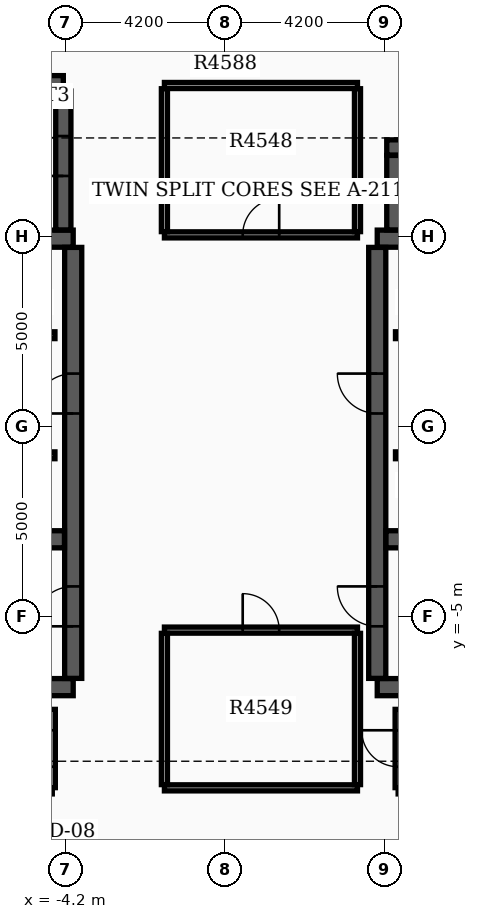
"""IFC4 building model, lengths in metres.
Left out: names, types, materials, properties, quantities, classifications, styles, units other than length and angle.
Written with IfcOpenShell. Run it as: python <this file> out.ifc"""

import sys

from ifc_helpers import new_model, si_unit, direction, frame, frame_2d, origin, place, context, subcontext, project, spatial, rectangle, extrude, element, fill, save


model = new_model("IFC4")
c1 = context("Model", 3, precision=1e-05, world=origin(), true_north=direction((0.0, 1.0)))
c2 = subcontext(c1, "Body", "Model", "MODEL_VIEW")
j1 = project(units=[si_unit("LENGTHUNIT", "METRE"), si_unit("PLANEANGLEUNIT", "RADIAN")], contexts=[c1])
p1 = place(None, origin())
s1 = spatial("IfcSite", under=j1, at=p1, CompositionType="ELEMENT")
p2 = place(p1, origin())
s2 = spatial("IfcBuilding", under=s1, at=p2, CompositionType="ELEMENT")
p3 = place(p2, frame((0.0, 0.0, 285.0)))
s3 = spatial("IfcBuildingStorey", under=s2, at=p3, CompositionType="ELEMENT", Elevation=285.0)
for number, where, z_axis, x_axis in (
    (1, (-12.4, -6.85, 0.0), (0.0, 0.0, 1.0), (1.0, 0.0, 0.0)),
    (2, (-12.4, 4.95, 0.0), (0.0, 0.0, 1.0), (1.0, 0.0, 0.0)),
):
    element("IfcWall", number, at=place(p3, frame(where, z_axis=z_axis, x_axis=x_axis)), inside=s3, PredefinedType="SHEAR", context=c2, shape_type="SweptSolid", body=[
        extrude(rectangle(XDim=8.4, YDim=0.45, at=frame_2d((4.2, 0.0))), origin(), (0.0, 0.0, 1.0), 3.65),
    ])
p4 = place(p3, frame((-4.0, -6.62, 0.0), z_axis=(0.0, 0.0, 1.0), x_axis=(0.0, 1.0, 0.0)))
e3 = element("IfcWall", 3, at=p4, inside=s3, PredefinedType="SHEAR", context=c2, shape_type="SweptSolid", body=[
    extrude(rectangle(XDim=11.34, YDim=0.45, at=frame_2d((5.67, 0.0))), origin(), (0.0, 0.0, 1.0), 3.65),
])
p5 = place(p4, frame((1.37, 0.0, 0.0)))
e4 = element("IfcOpeningElement", 4, at=p5, cuts=e3, PredefinedType="OPENING", context=c2, shape_type="SweptSolid", body=[
    extrude(rectangle(XDim=1.05, YDim=2.15, at=frame_2d((0.525, 1.075))), frame((0.0, 0.235, 0.0), z_axis=(0.0, -1.0, 0.0), x_axis=(1.0, 0.0, 0.0)), (0.0, 0.0, 1.0), 0.47),
])
p6 = place(p4, frame((6.97, 0.0, 0.0)))
e5 = element("IfcOpeningElement", 5, at=p6, cuts=e3, PredefinedType="OPENING", context=c2, shape_type="SweptSolid", body=[
    extrude(rectangle(XDim=1.05, YDim=2.15, at=frame_2d((0.525, 1.075))), frame((0.0, 0.235, 0.0), z_axis=(0.0, -1.0, 0.0), x_axis=(1.0, 0.0, 0.0)), (0.0, 0.0, 1.0), 0.47),
])
p7 = place(p3, frame((-12.17, -2.96, 0.0), z_axis=(0.0, 0.0, 1.0), x_axis=(1.0, 0.0, 0.0)))
e6 = element("IfcWall", 6, at=p7, inside=s3, PredefinedType="SHEAR", context=c2, shape_type="SweptSolid", body=[
    extrude(rectangle(XDim=7.94, YDim=0.45, at=frame_2d((3.97, 0.0))), origin(), (0.0, 0.0, 1.0), 3.65),
])
for number, where, z_axis, x_axis in (
    (7, (4.0, -6.85, 0.0), (0.0, 0.0, 1.0), (1.0, 0.0, 0.0)),
    (8, (4.0, 4.95, 0.0), (0.0, 0.0, 1.0), (1.0, 0.0, 0.0)),
):
    element("IfcWall", number, at=place(p3, frame(where, z_axis=z_axis, x_axis=x_axis)), inside=s3, PredefinedType="SHEAR", context=c2, shape_type="SweptSolid", body=[
        extrude(rectangle(XDim=8.4, YDim=0.45, at=frame_2d((4.2, 0.0))), origin(), (0.0, 0.0, 1.0), 3.65),
    ])
p8 = place(p3, frame((4.0, -6.62, 0.0), z_axis=(0.0, 0.0, 1.0), x_axis=(0.0, 1.0, 0.0)))
e9 = element("IfcWall", 9, at=p8, inside=s3, PredefinedType="SHEAR", context=c2, shape_type="SweptSolid", body=[
    extrude(rectangle(XDim=11.34, YDim=0.45, at=frame_2d((5.67, 0.0))), origin(), (0.0, 0.0, 1.0), 3.65),
])
p9 = place(p8, frame((1.37, 0.0, 0.0)))
e10 = element("IfcOpeningElement", 10, at=p9, cuts=e9, PredefinedType="OPENING", context=c2, shape_type="SweptSolid", body=[
    extrude(rectangle(XDim=1.05, YDim=2.15, at=frame_2d((0.525, 1.075))), frame((0.0, 0.235, 0.0), z_axis=(0.0, -1.0, 0.0), x_axis=(1.0, 0.0, 0.0)), (0.0, 0.0, 1.0), 0.47),
])
p10 = place(p8, frame((6.97, 0.0, 0.0)))
e11 = element("IfcOpeningElement", 11, at=p10, cuts=e9, PredefinedType="OPENING", context=c2, shape_type="SweptSolid", body=[
    extrude(rectangle(XDim=1.05, YDim=2.15, at=frame_2d((0.525, 1.075))), frame((0.0, 0.235, 0.0), z_axis=(0.0, -1.0, 0.0), x_axis=(1.0, 0.0, 0.0)), (0.0, 0.0, 1.0), 0.47),
])
p11 = place(p3, frame((4.23, -2.96, 0.0), z_axis=(0.0, 0.0, 1.0), x_axis=(1.0, 0.0, 0.0)))
e12 = element("IfcWall", 12, at=p11, inside=s3, PredefinedType="SHEAR", context=c2, shape_type="SweptSolid", body=[
    extrude(rectangle(XDim=7.94, YDim=0.45, at=frame_2d((3.97, 0.0))), origin(), (0.0, 0.0, 1.0), 3.65),
])
p12 = place(p3, frame((-12.22, 9.04, 0.0), z_axis=(0.0, 0.0, 1.0), x_axis=(1.0, 0.0, 0.0)))
e13 = element("IfcWall", 13, at=p12, inside=s3, PredefinedType="SHEAR", context=c2, shape_type="SweptSolid", body=[
    extrude(rectangle(XDim=7.96, YDim=0.4, at=frame_2d((3.98, 0.0))), origin(), (0.0, 0.0, 1.0), 3.65),
])
p13 = place(p3, frame((-4.26, 5.18, 0.0), z_axis=(0.0, 0.0, 1.0), x_axis=(0.0, 1.0, 0.0)))
e14 = element("IfcWall", 14, at=p13, inside=s3, PredefinedType="SHEAR", context=c2, shape_type="SweptSolid", body=[
    extrude(rectangle(XDim=3.655, YDim=0.4, at=frame_2d((1.828, 0.0))), origin(), (0.0, 0.0, 1.0), 3.65),
])
p14 = place(p13, frame((1.42, 0.0, 0.0)))
e15 = element("IfcOpeningElement", 15, at=p14, cuts=e14, PredefinedType="OPENING", context=c2, shape_type="SweptSolid", body=[
    extrude(rectangle(XDim=1.05, YDim=2.15, at=frame_2d((0.525, 1.075))), frame((0.0, 0.21, 0.0), z_axis=(0.0, -1.0, 0.0), x_axis=(1.0, 0.0, 0.0)), (0.0, 0.0, 1.0), 0.42),
])
p15 = place(p3, frame((4.45, 5.18, 0.0), z_axis=(0.0, 0.0, 1.0), x_axis=(0.0, 1.0, 0.0)))
e16 = element("IfcWall", 16, at=p15, inside=s3, PredefinedType="SHEAR", context=c2, shape_type="SweptSolid", body=[
    extrude(rectangle(XDim=1.96, YDim=0.4, at=frame_2d((0.98, 0.0))), origin(), (0.0, 0.0, 1.0), 3.65),
])
p16 = place(p3, frame((4.25, 7.35, 0.0), z_axis=(0.0, 0.0, 1.0), x_axis=(1.0, 0.0, 0.0)))
e17 = element("IfcWall", 17, at=p16, inside=s3, PredefinedType="SHEAR", context=c2, shape_type="SweptSolid", body=[
    extrude(rectangle(XDim=5.4, YDim=0.4, at=frame_2d((2.7, 0.0))), origin(), (0.0, 0.0, 1.0), 3.65),
])
p17 = place(p3, frame((-11.9, 2.41, 0.0), z_axis=(0.0, 0.0, 1.0), x_axis=(1.0, 0.0, 0.0)))
e18 = element("IfcWall", 18, at=p17, inside=s3, PredefinedType="SOLIDWALL", context=c2, shape_type="SweptSolid", body=[
    extrude(rectangle(XDim=7.42, YDim=0.18, at=frame_2d((3.71, 0.0))), origin(), (0.0, 0.0, 1.0), 3.12),
])
p18 = place(p17, frame((0.55, 0.0, 0.0)))
e19 = element("IfcOpeningElement", 19, at=p18, cuts=e18, PredefinedType="OPENING", context=c2, shape_type="SweptSolid", body=[
    extrude(rectangle(XDim=1.1, YDim=2.15, at=frame_2d((0.55, 1.075))), frame((0.0, 0.1, 0.0), z_axis=(0.0, -1.0, 0.0), x_axis=(1.0, 0.0, 0.0)), (0.0, 0.0, 1.0), 0.2),
])
p19 = place(p17, frame((4.9, 0.0, 0.0)))
e20 = element("IfcOpeningElement", 20, at=p19, cuts=e18, PredefinedType="OPENING", context=c2, shape_type="SweptSolid", body=[
    extrude(rectangle(XDim=0.88, YDim=2.1, at=frame_2d((0.44, 1.05))), frame((0.0, 0.1, 0.0), z_axis=(0.0, -1.0, 0.0), x_axis=(1.0, 0.0, 0.0)), (0.0, 0.0, 1.0), 0.2),
])
p20 = place(p3, frame((4.48, 2.41, 0.0), z_axis=(0.0, 0.0, 1.0), x_axis=(1.0, 0.0, 0.0)))
e21 = element("IfcWall", 21, at=p20, inside=s3, PredefinedType="SOLIDWALL", context=c2, shape_type="SweptSolid", body=[
    extrude(rectangle(XDim=7.42, YDim=0.18, at=frame_2d((3.71, 0.0))), origin(), (0.0, 0.0, 1.0), 3.12),
])
p21 = place(p20, frame((5.67, 0.0, 0.0)))
e22 = element("IfcOpeningElement", 22, at=p21, cuts=e21, PredefinedType="OPENING", context=c2, shape_type="SweptSolid", body=[
    extrude(rectangle(XDim=1.1, YDim=2.15, at=frame_2d((0.55, 1.075))), frame((0.0, 0.1, 0.0), z_axis=(0.0, -1.0, 0.0), x_axis=(1.0, 0.0, 0.0)), (0.0, 0.0, 1.0), 0.2),
])
p22 = place(p20, frame((1.6, 0.0, 0.0)))
e23 = element("IfcOpeningElement", 23, at=p22, cuts=e21, PredefinedType="OPENING", context=c2, shape_type="SweptSolid", body=[
    extrude(rectangle(XDim=0.88, YDim=2.1, at=frame_2d((0.44, 1.05))), frame((0.0, 0.1, 0.0), z_axis=(0.0, -1.0, 0.0), x_axis=(1.0, 0.0, 0.0)), (0.0, 0.0, 1.0), 0.2),
])
p23 = place(p3, frame((-11.9, -0.75, 0.0), z_axis=(0.0, 0.0, 1.0), x_axis=(1.0, 0.0, 0.0)))
e24 = element("IfcWall", 24, at=p23, inside=s3, PredefinedType="SOLIDWALL", context=c2, shape_type="SweptSolid", body=[
    extrude(rectangle(XDim=7.42, YDim=0.18, at=frame_2d((3.71, 0.0))), origin(), (0.0, 0.0, 1.0), 3.12),
])
p24 = place(p23, frame((5.75, 0.0, 0.0)))
e25 = element("IfcOpeningElement", 25, at=p24, cuts=e24, PredefinedType="OPENING", context=c2, shape_type="SweptSolid", body=[
    extrude(rectangle(XDim=1.1, YDim=2.15, at=frame_2d((0.55, 1.075))), frame((0.0, 0.1, 0.0), z_axis=(0.0, -1.0, 0.0), x_axis=(1.0, 0.0, 0.0)), (0.0, 0.0, 1.0), 0.2),
])
p25 = place(p23, frame((1.6, 0.0, 0.0)))
e26 = element("IfcOpeningElement", 26, at=p25, cuts=e24, PredefinedType="OPENING", context=c2, shape_type="SweptSolid", body=[
    extrude(rectangle(XDim=0.88, YDim=2.1, at=frame_2d((0.44, 1.05))), frame((0.0, 0.1, 0.0), z_axis=(0.0, -1.0, 0.0), x_axis=(1.0, 0.0, 0.0)), (0.0, 0.0, 1.0), 0.2),
])
p26 = place(p3, frame((4.48, -0.75, 0.0), z_axis=(0.0, 0.0, 1.0), x_axis=(1.0, 0.0, 0.0)))
e27 = element("IfcWall", 27, at=p26, inside=s3, PredefinedType="SOLIDWALL", context=c2, shape_type="SweptSolid", body=[
    extrude(rectangle(XDim=7.42, YDim=0.18, at=frame_2d((3.71, 0.0))), origin(), (0.0, 0.0, 1.0), 3.12),
])
p27 = place(p26, frame((3.92, 0.0, 0.0)))
e28 = element("IfcOpeningElement", 28, at=p27, cuts=e27, PredefinedType="OPENING", context=c2, shape_type="SweptSolid", body=[
    extrude(rectangle(XDim=1.1, YDim=2.15, at=frame_2d((0.55, 1.075))), frame((0.0, 0.1, 0.0), z_axis=(0.0, -1.0, 0.0), x_axis=(1.0, 0.0, 0.0)), (0.0, 0.0, 1.0), 0.2),
])
p28 = place(p26, frame((5.82, 0.0, 0.0)))
e29 = element("IfcOpeningElement", 29, at=p28, cuts=e27, PredefinedType="OPENING", context=c2, shape_type="SweptSolid", body=[
    extrude(rectangle(XDim=1.1, YDim=2.15, at=frame_2d((0.55, 1.075))), frame((0.0, 0.1, 0.0), z_axis=(0.0, -1.0, 0.0), x_axis=(1.0, 0.0, 0.0)), (0.0, 0.0, 1.0), 0.2),
])
p29 = place(p26, frame((1.6, 0.0, 0.0)))
e30 = element("IfcOpeningElement", 30, at=p29, cuts=e27, PredefinedType="OPENING", context=c2, shape_type="SweptSolid", body=[
    extrude(rectangle(XDim=0.88, YDim=2.1, at=frame_2d((0.44, 1.05))), frame((0.0, 0.1, 0.0), z_axis=(0.0, -1.0, 0.0), x_axis=(1.0, 0.0, 0.0)), (0.0, 0.0, 1.0), 0.2),
])
p30 = place(p3, frame((-1.6, 5.05, 0.0), z_axis=(0.0, 0.0, 1.0), x_axis=(1.0, 0.0, 0.0)))
e31 = element("IfcWall", 31, at=p30, inside=s3, PredefinedType="PARTITIONING", context=c2, shape_type="SweptSolid", body=[
    extrude(rectangle(XDim=5.08, YDim=0.16, at=frame_2d((2.54, 0.0))), origin(), (0.0, 0.0, 1.0), 3.12),
])
p31 = place(p30, frame((2.06, 0.0, 0.0)))
e32 = element("IfcOpeningElement", 32, at=p31, cuts=e31, PredefinedType="OPENING", context=c2, shape_type="SweptSolid", body=[
    extrude(rectangle(XDim=0.96, YDim=2.15, at=frame_2d((0.48, 1.075))), frame((0.0, 0.09, 0.0), z_axis=(0.0, -1.0, 0.0), x_axis=(1.0, 0.0, 0.0)), (0.0, 0.0, 1.0), 0.18),
])
p32 = place(p3, frame((-1.6, 8.98, 0.0), z_axis=(0.0, 0.0, 1.0), x_axis=(1.0, 0.0, 0.0)))
e33 = element("IfcWall", 33, at=p32, inside=s3, PredefinedType="PARTITIONING", context=c2, shape_type="SweptSolid", body=[
    extrude(rectangle(XDim=5.08, YDim=0.16, at=frame_2d((2.54, 0.0))), origin(), (0.0, 0.0, 1.0), 3.12),
])
for number, where, z_axis, x_axis in (
    (34, (-1.6, 5.135, 0.0), (0.0, 0.0, 1.0), (0.0, 1.0, 0.0)),
    (35, (3.48, 5.135, 0.0), (0.0, 0.0, 1.0), (0.0, 1.0, 0.0)),
):
    element("IfcWall", number, at=place(p3, frame(where, z_axis=z_axis, x_axis=x_axis)), inside=s3, PredefinedType="PARTITIONING", context=c2, shape_type="SweptSolid", body=[
        extrude(rectangle(XDim=3.76, YDim=0.16, at=frame_2d((1.88, 0.0))), origin(), (0.0, 0.0, 1.0), 3.12),
    ])
p33 = place(p3, frame((-1.6, -9.5, 0.0), z_axis=(0.0, 0.0, 1.0), x_axis=(1.0, 0.0, 0.0)))
e36 = element("IfcWall", 36, at=p33, inside=s3, PredefinedType="PARTITIONING", context=c2, shape_type="SweptSolid", body=[
    extrude(rectangle(XDim=5.08, YDim=0.16, at=frame_2d((2.54, 0.0))), origin(), (0.0, 0.0, 1.0), 3.12),
])
p34 = place(p3, frame((-1.6, -5.35, 0.0), z_axis=(0.0, 0.0, 1.0), x_axis=(1.0, 0.0, 0.0)))
e37 = element("IfcWall", 37, at=p34, inside=s3, PredefinedType="PARTITIONING", context=c2, shape_type="SweptSolid", body=[
    extrude(rectangle(XDim=5.08, YDim=0.16, at=frame_2d((2.54, 0.0))), origin(), (0.0, 0.0, 1.0), 3.12),
])
p35 = place(p34, frame((2.06, 0.0, 0.0)))
e38 = element("IfcOpeningElement", 38, at=p35, cuts=e37, PredefinedType="OPENING", context=c2, shape_type="SweptSolid", body=[
    extrude(rectangle(XDim=0.96, YDim=2.15, at=frame_2d((0.48, 1.075))), frame((0.0, 0.09, 0.0), z_axis=(0.0, -1.0, 0.0), x_axis=(1.0, 0.0, 0.0)), (0.0, 0.0, 1.0), 0.18),
])
for number, where, z_axis, x_axis in (
    (39, (-1.6, -9.415, 0.0), (0.0, 0.0, 1.0), (0.0, 1.0, 0.0)),
    (40, (3.48, -9.415, 0.0), (0.0, 0.0, 1.0), (0.0, 1.0, 0.0)),
):
    element("IfcWall", number, at=place(p3, frame(where, z_axis=z_axis, x_axis=x_axis)), inside=s3, PredefinedType="PARTITIONING", context=c2, shape_type="SweptSolid", body=[
        extrude(rectangle(XDim=3.98, YDim=0.16, at=frame_2d((1.99, 0.0))), origin(), (0.0, 0.0, 1.0), 3.12),
    ])
p36 = place(p3, frame((4.55, -9.58, 0.0), z_axis=(0.0, 0.0, 1.0), x_axis=(1.0, 0.0, 0.0)))
e41 = element("IfcWall", 41, at=p36, inside=s3, PredefinedType="PARTITIONING", context=c2, shape_type="SweptSolid", body=[
    extrude(rectangle(XDim=8.1, YDim=0.16, at=frame_2d((4.05, 0.0))), origin(), (0.0, 0.0, 1.0), 3.12),
])
p37 = place(p3, frame((4.55, -9.495, 0.0), z_axis=(0.0, 0.0, 1.0), x_axis=(0.0, 1.0, 0.0)))
e42 = element("IfcWall", 42, at=p37, inside=s3, PredefinedType="PARTITIONING", context=c2, shape_type="SweptSolid", body=[
    extrude(rectangle(XDim=2.06, YDim=0.16, at=frame_2d((1.03, 0.0))), origin(), (0.0, 0.0, 1.0), 3.12),
])
p38 = place(p37, frame((0.55, 0.0, 0.0)))
e43 = element("IfcOpeningElement", 43, at=p38, cuts=e42, PredefinedType="OPENING", context=c2, shape_type="SweptSolid", body=[
    extrude(rectangle(XDim=0.96, YDim=2.15, at=frame_2d((0.48, 1.075))), frame((0.0, 0.09, 0.0), z_axis=(0.0, -1.0, 0.0), x_axis=(1.0, 0.0, 0.0)), (0.0, 0.0, 1.0), 0.18),
])
p39 = place(p3, frame((-4.55, -9.495, 0.0), z_axis=(0.0, 0.0, 1.0), x_axis=(0.0, 1.0, 0.0)))
e44 = element("IfcWall", 44, at=p39, inside=s3, PredefinedType="PARTITIONING", context=c2, shape_type="SweptSolid", body=[
    extrude(rectangle(XDim=2.06, YDim=0.16, at=frame_2d((1.03, 0.0))), origin(), (0.0, 0.0, 1.0), 3.12),
])
p40 = place(p39, frame((0.55, 0.0, 0.0)))
e45 = element("IfcOpeningElement", 45, at=p40, cuts=e44, PredefinedType="OPENING", context=c2, shape_type="SweptSolid", body=[
    extrude(rectangle(XDim=0.96, YDim=2.15, at=frame_2d((0.48, 1.075))), frame((0.0, 0.09, 0.0), z_axis=(0.0, -1.0, 0.0), x_axis=(1.0, 0.0, 0.0)), (0.0, 0.0, 1.0), 0.18),
])
p41 = place(p5, origin())
e46 = element("IfcDoor", 46, at=p41, inside=s3, OperationType="SINGLE_SWING_LEFT", PredefinedType="DOOR", context=c2, shape_type="SweptSolid", body=[
    extrude(rectangle(XDim=1.05, YDim=2.15, at=frame_2d((0.525, 1.075))), frame((0.0, 0.025, 0.0), z_axis=(0.0, -1.0, 0.0), x_axis=(1.0, 0.0, 0.0)), (0.0, 0.0, 1.0), 0.05),
])
fill(e4, e46)
p42 = place(p9, origin())
e47 = element("IfcDoor", 47, at=p42, inside=s3, OperationType="SINGLE_SWING_RIGHT", PredefinedType="DOOR", context=c2, shape_type="SweptSolid", body=[
    extrude(rectangle(XDim=1.05, YDim=2.15, at=frame_2d((0.525, 1.075))), frame((0.0, 0.025, 0.0), z_axis=(0.0, -1.0, 0.0), x_axis=(1.0, 0.0, 0.0)), (0.0, 0.0, 1.0), 0.05),
])
fill(e10, e47)
p43 = place(p6, origin())
e48 = element("IfcDoor", 48, at=p43, inside=s3, OperationType="SINGLE_SWING_LEFT", PredefinedType="DOOR", context=c2, shape_type="SweptSolid", body=[
    extrude(rectangle(XDim=1.05, YDim=2.15, at=frame_2d((0.525, 1.075))), frame((0.0, 0.025, 0.0), z_axis=(0.0, -1.0, 0.0), x_axis=(1.0, 0.0, 0.0)), (0.0, 0.0, 1.0), 0.05),
])
fill(e5, e48)
p44 = place(p10, origin())
e49 = element("IfcDoor", 49, at=p44, inside=s3, OperationType="SINGLE_SWING_RIGHT", PredefinedType="DOOR", context=c2, shape_type="SweptSolid", body=[
    extrude(rectangle(XDim=1.05, YDim=2.15, at=frame_2d((0.525, 1.075))), frame((0.0, 0.025, 0.0), z_axis=(0.0, -1.0, 0.0), x_axis=(1.0, 0.0, 0.0)), (0.0, 0.0, 1.0), 0.05),
])
fill(e11, e49)
p45 = place(p14, origin())
e50 = element("IfcDoor", 50, at=p45, inside=s3, OperationType="SINGLE_SWING_LEFT", PredefinedType="DOOR", context=c2, shape_type="SweptSolid", body=[
    extrude(rectangle(XDim=1.05, YDim=2.15, at=frame_2d((0.525, 1.075))), frame((0.0, 0.025, 0.0), z_axis=(0.0, -1.0, 0.0), x_axis=(1.0, 0.0, 0.0)), (0.0, 0.0, 1.0), 0.05),
])
fill(e15, e50)
p46 = place(p31, origin())
e51 = element("IfcDoor", 51, at=p46, inside=s3, OperationType="SINGLE_SWING_RIGHT", PredefinedType="DOOR", context=c2, shape_type="SweptSolid", body=[
    extrude(rectangle(XDim=0.96, YDim=2.15, at=frame_2d((0.48, 1.075))), frame((0.0, 0.025, 0.0), z_axis=(0.0, -1.0, 0.0), x_axis=(1.0, 0.0, 0.0)), (0.0, 0.0, 1.0), 0.05),
])
fill(e32, e51)
p47 = place(p35, origin())
e52 = element("IfcDoor", 52, at=p47, inside=s3, OperationType="SINGLE_SWING_LEFT", PredefinedType="DOOR", context=c2, shape_type="SweptSolid", body=[
    extrude(rectangle(XDim=0.96, YDim=2.15, at=frame_2d((0.48, 1.075))), frame((0.0, 0.025, 0.0), z_axis=(0.0, -1.0, 0.0), x_axis=(1.0, 0.0, 0.0)), (0.0, 0.0, 1.0), 0.05),
])
fill(e38, e52)
p48 = place(p38, origin())
e53 = element("IfcDoor", 53, at=p48, inside=s3, OperationType="SINGLE_SWING_RIGHT", PredefinedType="DOOR", context=c2, shape_type="SweptSolid", body=[
    extrude(rectangle(XDim=0.96, YDim=2.15, at=frame_2d((0.48, 1.075))), frame((0.0, 0.025, 0.0), z_axis=(0.0, -1.0, 0.0), x_axis=(1.0, 0.0, 0.0)), (0.0, 0.0, 1.0), 0.05),
])
fill(e43, e53)
p49 = place(p40, origin())
e54 = element("IfcDoor", 54, at=p49, inside=s3, OperationType="SINGLE_SWING_LEFT", PredefinedType="DOOR", context=c2, shape_type="SweptSolid", body=[
    extrude(rectangle(XDim=0.96, YDim=2.15, at=frame_2d((0.48, 1.075))), frame((0.0, 0.025, 0.0), z_axis=(0.0, -1.0, 0.0), x_axis=(1.0, 0.0, 0.0)), (0.0, 0.0, 1.0), 0.05),
])
fill(e45, e54)
save(model, sys.argv[1])
